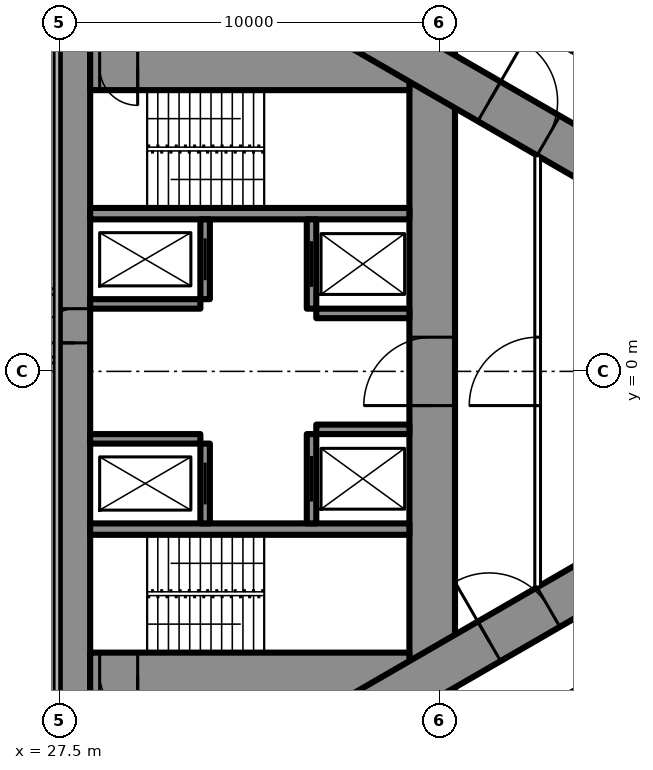
"""IFC4 building model, lengths in metres.
Left out: names, types, materials, properties, quantities, classifications, styles, units other than length and angle.
Written with IfcOpenShell. Run it as: python <this file> out.ifc"""

import sys

from ifc_helpers import new_model, si_unit, direction, frame, frame_2d, origin, place, context, subcontext, project, spatial, rectangle, extrude, element, fill, save


model = new_model("IFC4")
c1 = context("Model", 3, precision=1e-05, world=origin(), true_north=direction((0.0, 1.0)))
c2 = subcontext(c1, "Body", "Model", "MODEL_VIEW")
j1 = project(units=[si_unit("LENGTHUNIT", "METRE"), si_unit("PLANEANGLEUNIT", "RADIAN")], contexts=[c1])
p1 = place(None, origin())
s1 = spatial("IfcSite", under=j1, at=p1, CompositionType="ELEMENT")
p2 = place(p1, origin())
s2 = spatial("IfcBuilding", under=s1, at=p2, CompositionType="ELEMENT")
p3 = place(p2, frame((0.0, 0.0, 247.7)))
s3 = spatial("IfcBuildingStorey", under=s2, at=p3, CompositionType="ELEMENT", Elevation=247.7)
p4 = place(p3, frame((27.9, -8.6, 0.0), z_axis=(0.0, 0.0, 1.0), x_axis=(0.0, 1.0, 0.0)))
e1 = element("IfcWall", 1, at=p4, inside=s3, PredefinedType="SHEAR", context=c2, shape_type="SweptSolid", body=[
    extrude(rectangle(XDim=17.2, YDim=0.8, at=frame_2d((8.6, 0.0))), origin(), (0.0, 0.0, 1.0), 4.2),
])
p5 = place(p4, frame((9.35, 0.0, 0.0)))
e2 = element("IfcOpeningElement", 2, at=p5, cuts=e1, PredefinedType="OPENING", context=c2, shape_type="SweptSolid", body=[
    extrude(rectangle(XDim=0.9, YDim=2.2, at=frame_2d((0.45, 1.1))), frame((0.0, 0.41, 0.0), z_axis=(0.0, -1.0, 0.0), x_axis=(1.0, 0.0, 0.0)), (0.0, 0.0, 1.0), 0.82),
])
p6 = place(p3, frame((37.3, -8.6, 0.0), z_axis=(0.0, 0.0, 1.0), x_axis=(0.0, 1.0, 0.0)))
e3 = element("IfcWall", 3, at=p6, inside=s3, PredefinedType="SHEAR", context=c2, shape_type="SweptSolid", body=[
    extrude(rectangle(XDim=17.2, YDim=1.2, at=frame_2d((8.6, 0.0))), origin(), (0.0, 0.0, 1.0), 4.2),
])
p7 = place(p6, frame((7.7, 0.0, 0.0)))
e4 = element("IfcOpeningElement", 4, at=p7, cuts=e3, PredefinedType="OPENING", context=c2, shape_type="SweptSolid", body=[
    extrude(rectangle(XDim=1.8, YDim=2.2, at=frame_2d((0.9, 1.1))), frame((0.0, 0.61, 0.0), z_axis=(0.0, -1.0, 0.0), x_axis=(1.0, 0.0, 0.0)), (0.0, 0.0, 1.0), 1.22),
])
p8 = place(p3, frame((28.3, -8.0, 0.0), z_axis=(0.0, 0.0, 1.0), x_axis=(1.0, 0.0, 0.0)))
e5 = element("IfcWall", 5, at=p8, inside=s3, PredefinedType="SHEAR", context=c2, shape_type="SweptSolid", body=[
    extrude(rectangle(XDim=8.4, YDim=1.2, at=frame_2d((4.2, 0.0))), origin(), (0.0, 0.0, 1.0), 4.2),
])
p9 = place(p8, frame((0.25, 0.0, 0.0)))
e6 = element("IfcOpeningElement", 6, at=p9, cuts=e5, PredefinedType="OPENING", context=c2, shape_type="SweptSolid", body=[
    extrude(rectangle(XDim=1.0, YDim=2.2, at=frame_2d((0.5, 1.1))), frame((0.0, 0.61, 0.0), z_axis=(0.0, -1.0, 0.0), x_axis=(1.0, 0.0, 0.0)), (0.0, 0.0, 1.0), 1.22),
])
p10 = place(p3, frame((28.3, 8.0, 0.0), z_axis=(0.0, 0.0, 1.0), x_axis=(1.0, 0.0, 0.0)))
e7 = element("IfcWall", 7, at=p10, inside=s3, PredefinedType="SHEAR", context=c2, shape_type="SweptSolid", body=[
    extrude(rectangle(XDim=8.4, YDim=1.2, at=frame_2d((4.2, 0.0))), origin(), (0.0, 0.0, 1.0), 4.2),
])
p11 = place(p10, frame((0.25, 0.0, 0.0)))
e8 = element("IfcOpeningElement", 8, at=p11, cuts=e7, PredefinedType="OPENING", context=c2, shape_type="SweptSolid", body=[
    extrude(rectangle(XDim=1.0, YDim=2.2, at=frame_2d((0.5, 1.1))), frame((0.0, 0.61, 0.0), z_axis=(0.0, -1.0, 0.0), x_axis=(1.0, 0.0, 0.0)), (0.0, 0.0, 1.0), 1.22),
])
for number, where, z_axis, x_axis in (
    (9, (28.3, -4.15, 0.0), (0.0, 0.0, 1.0), (1.0, 0.0, 0.0)),
    (10, (28.3, 4.15, 0.0), (0.0, 0.0, 1.0), (1.0, 0.0, 0.0)),
):
    element("IfcWall", number, at=place(p3, frame(where, z_axis=z_axis, x_axis=x_axis)), inside=s3, PredefinedType="SHEAR", context=c2, shape_type="SweptSolid", body=[
        extrude(rectangle(XDim=8.4, YDim=0.3, at=frame_2d((4.2, 0.0))), origin(), (0.0, 0.0, 1.0), 4.2),
    ])
p12 = place(p3, frame((31.325, -4.0, 0.0), z_axis=(0.0, 0.0, 1.0), x_axis=(0.0, 1.0, 0.0)))
e11 = element("IfcWall", 11, at=p12, inside=s3, PredefinedType="SHEAR", context=c2, shape_type="SweptSolid", body=[
    extrude(rectangle(XDim=2.1, YDim=0.25, at=frame_2d((1.05, 0.0))), origin(), (0.0, 0.0, 1.0), 4.2),
])
p13 = place(p12, frame((0.5, 0.0, 0.0)))
e12 = element("IfcOpeningElement", 12, at=p13, cuts=e11, PredefinedType="OPENING", context=c2, shape_type="SweptSolid", body=[
    extrude(rectangle(XDim=1.1, YDim=2.2, at=frame_2d((0.55, 1.1))), frame((0.0, 0.135, 0.0), z_axis=(0.0, -1.0, 0.0), x_axis=(1.0, 0.0, 0.0)), (0.0, 0.0, 1.0), 0.27),
])
p14 = place(p3, frame((34.125, -4.0, 0.0), z_axis=(0.0, 0.0, 1.0), x_axis=(0.0, 1.0, 0.0)))
e13 = element("IfcWall", 13, at=p14, inside=s3, PredefinedType="SHEAR", context=c2, shape_type="SweptSolid", body=[
    extrude(rectangle(XDim=2.35, YDim=0.25, at=frame_2d((1.175, 0.0))), origin(), (0.0, 0.0, 1.0), 4.2),
])
p15 = place(p14, frame((0.575, 0.0, 0.0)))
e14 = element("IfcOpeningElement", 14, at=p15, cuts=e13, PredefinedType="OPENING", context=c2, shape_type="SweptSolid", body=[
    extrude(rectangle(XDim=1.2, YDim=2.2, at=frame_2d((0.6, 1.1))), frame((0.0, 0.135, 0.0), z_axis=(0.0, -1.0, 0.0), x_axis=(1.0, 0.0, 0.0)), (0.0, 0.0, 1.0), 0.27),
])
p16 = place(p3, frame((28.3, -1.775, 0.0), z_axis=(0.0, 0.0, 1.0), x_axis=(1.0, 0.0, 0.0)))
e15 = element("IfcWall", 15, at=p16, inside=s3, PredefinedType="SHEAR", context=c2, shape_type="SweptSolid", body=[
    extrude(rectangle(XDim=2.9, YDim=0.25, at=frame_2d((1.45, 0.0))), origin(), (0.0, 0.0, 1.0), 4.2),
])
p17 = place(p3, frame((34.25, -1.525, 0.0), z_axis=(0.0, 0.0, 1.0), x_axis=(1.0, 0.0, 0.0)))
e16 = element("IfcWall", 16, at=p17, inside=s3, PredefinedType="SHEAR", context=c2, shape_type="SweptSolid", body=[
    extrude(rectangle(XDim=2.45, YDim=0.25, at=frame_2d((1.225, 0.0))), origin(), (0.0, 0.0, 1.0), 4.2),
])
p18 = place(p3, frame((31.325, 1.9, 0.0), z_axis=(0.0, 0.0, 1.0), x_axis=(0.0, 1.0, 0.0)))
e17 = element("IfcWall", 17, at=p18, inside=s3, PredefinedType="SHEAR", context=c2, shape_type="SweptSolid", body=[
    extrude(rectangle(XDim=2.1, YDim=0.25, at=frame_2d((1.05, 0.0))), origin(), (0.0, 0.0, 1.0), 4.2),
])
p19 = place(p18, frame((0.5, 0.0, 0.0)))
e18 = element("IfcOpeningElement", 18, at=p19, cuts=e17, PredefinedType="OPENING", context=c2, shape_type="SweptSolid", body=[
    extrude(rectangle(XDim=1.1, YDim=2.2, at=frame_2d((0.55, 1.1))), frame((0.0, 0.135, 0.0), z_axis=(0.0, -1.0, 0.0), x_axis=(1.0, 0.0, 0.0)), (0.0, 0.0, 1.0), 0.27),
])
p20 = place(p3, frame((34.125, 1.65, 0.0), z_axis=(0.0, 0.0, 1.0), x_axis=(0.0, 1.0, 0.0)))
e19 = element("IfcWall", 19, at=p20, inside=s3, PredefinedType="SHEAR", context=c2, shape_type="SweptSolid", body=[
    extrude(rectangle(XDim=2.35, YDim=0.25, at=frame_2d((1.175, 0.0))), origin(), (0.0, 0.0, 1.0), 4.2),
])
p21 = place(p20, frame((0.575, 0.0, 0.0)))
e20 = element("IfcOpeningElement", 20, at=p21, cuts=e19, PredefinedType="OPENING", context=c2, shape_type="SweptSolid", body=[
    extrude(rectangle(XDim=1.2, YDim=2.2, at=frame_2d((0.6, 1.1))), frame((0.0, 0.135, 0.0), z_axis=(0.0, -1.0, 0.0), x_axis=(1.0, 0.0, 0.0)), (0.0, 0.0, 1.0), 0.27),
])
p22 = place(p3, frame((28.3, 1.775, 0.0), z_axis=(0.0, 0.0, 1.0), x_axis=(1.0, 0.0, 0.0)))
e21 = element("IfcWall", 21, at=p22, inside=s3, PredefinedType="SHEAR", context=c2, shape_type="SweptSolid", body=[
    extrude(rectangle(XDim=2.9, YDim=0.25, at=frame_2d((1.45, 0.0))), origin(), (0.0, 0.0, 1.0), 4.2),
])
p23 = place(p3, frame((34.25, 1.525, 0.0), z_axis=(0.0, 0.0, 1.0), x_axis=(1.0, 0.0, 0.0)))
e22 = element("IfcWall", 22, at=p23, inside=s3, PredefinedType="SHEAR", context=c2, shape_type="SweptSolid", body=[
    extrude(rectangle(XDim=2.45, YDim=0.25, at=frame_2d((1.225, 0.0))), origin(), (0.0, 0.0, 1.0), 4.2),
])
p24 = place(p3, frame((27.2, -13.8, 0.0), z_axis=(0.0, 0.0, 1.0), x_axis=(0.866027159892, 0.499996958321, 0.0)))
e23 = element("IfcWall", 23, at=p24, inside=s3, PredefinedType="SHEAR", context=c2, shape_type="SweptSolid", body=[
    extrude(rectangle(XDim=27.947, YDim=1.2, at=frame_2d((13.973, 0.0))), origin(), (0.0, 0.0, 1.0), 4.2),
])
p25 = place(p24, frame((4.6, 0.0, 0.0)))
e24 = element("IfcOpeningElement", 24, at=p25, cuts=e23, PredefinedType="OPENING", context=c2, shape_type="SweptSolid", body=[
    extrude(rectangle(XDim=1.0, YDim=2.2, at=frame_2d((0.5, 1.1))), frame((0.0, 0.61, 0.0), z_axis=(0.0, -1.0, 0.0), x_axis=(1.0, 0.0, 0.0)), (0.0, 0.0, 1.0), 1.22),
])
p26 = place(p24, frame((13.395, 0.0, 0.0)))
e25 = element("IfcOpeningElement", 25, at=p26, cuts=e23, PredefinedType="OPENING", context=c2, shape_type="SweptSolid", body=[
    extrude(rectangle(XDim=1.8, YDim=2.2, at=frame_2d((0.9, 1.1))), frame((0.0, 0.61, 0.0), z_axis=(0.0, -1.0, 0.0), x_axis=(1.0, 0.0, 0.0)), (0.0, 0.0, 1.0), 1.22),
])
p27 = place(p3, frame((27.2, 13.8, 0.0), z_axis=(0.0, 0.0, 1.0), x_axis=(0.866024515034, -0.500001539357, 0.0)))
e26 = element("IfcWall", 26, at=p27, inside=s3, PredefinedType="SHEAR", context=c2, shape_type="SweptSolid", body=[
    extrude(rectangle(XDim=26.907, YDim=1.2, at=frame_2d((13.454, 0.0))), origin(), (0.0, 0.0, 1.0), 4.2),
])
p28 = place(p27, frame((4.6, 0.0, 0.0)))
e27 = element("IfcOpeningElement", 27, at=p28, cuts=e26, PredefinedType="OPENING", context=c2, shape_type="SweptSolid", body=[
    extrude(rectangle(XDim=1.0, YDim=2.2, at=frame_2d((0.5, 1.1))), frame((0.0, 0.61, 0.0), z_axis=(0.0, -1.0, 0.0), x_axis=(1.0, 0.0, 0.0)), (0.0, 0.0, 1.0), 1.22),
])
p29 = place(p27, frame((13.395, 0.0, 0.0)))
e28 = element("IfcOpeningElement", 28, at=p29, cuts=e26, PredefinedType="OPENING", context=c2, shape_type="SweptSolid", body=[
    extrude(rectangle(XDim=1.8, YDim=2.2, at=frame_2d((0.9, 1.1))), frame((0.0, 0.61, 0.0), z_axis=(0.0, -1.0, 0.0), x_axis=(1.0, 0.0, 0.0)), (0.0, 0.0, 1.0), 1.22),
])
p30 = place(p3, frame((28.907, -15.47, 0.0), z_axis=(0.0, 0.0, 1.0), x_axis=(0.866023700353, 0.500002950419, 0.0)))
e29 = element("IfcWall", 29, at=p30, inside=s3, PredefinedType="PARTITIONING", context=c2, shape_type="SweptSolid", body=[
    extrude(rectangle(XDim=30.941, YDim=0.2, at=frame_2d((15.47, 0.0))), origin(), (0.0, 0.0, 1.0), 3.95),
])
p31 = place(p30, frame((7.124, 0.0, 0.0)))
e30 = element("IfcOpeningElement", 30, at=p31, cuts=e29, PredefinedType="OPENING", context=c2, shape_type="SweptSolid", body=[
    extrude(rectangle(XDim=1.8, YDim=2.2, at=frame_2d((0.9, 1.1))), frame((0.0, 0.11, 0.0), z_axis=(0.0, -1.0, 0.0), x_axis=(1.0, 0.0, 0.0)), (0.0, 0.0, 1.0), 0.22),
])
p32 = place(p30, frame((16.865, 0.0, 0.0)))
e31 = element("IfcOpeningElement", 31, at=p32, cuts=e29, PredefinedType="OPENING", context=c2, shape_type="SweptSolid", body=[
    extrude(rectangle(XDim=1.8, YDim=2.2, at=frame_2d((0.9, 1.1))), frame((0.0, 0.11, 0.0), z_axis=(0.0, -1.0, 0.0), x_axis=(1.0, 0.0, 0.0)), (0.0, 0.0, 1.0), 0.22),
])
p33 = place(p30, frame((20.748, 0.0, 0.0)))
e32 = element("IfcOpeningElement", 32, at=p33, cuts=e29, PredefinedType="OPENING", context=c2, shape_type="SweptSolid", body=[
    extrude(rectangle(XDim=1.8, YDim=2.2, at=frame_2d((0.9, 1.1))), frame((0.0, 0.11, 0.0), z_axis=(0.0, -1.0, 0.0), x_axis=(1.0, 0.0, 0.0)), (0.0, 0.0, 1.0), 0.22),
])
p34 = place(p30, frame((26.252, 0.0, 0.0)))
e33 = element("IfcOpeningElement", 33, at=p34, cuts=e29, PredefinedType="OPENING", context=c2, shape_type="SweptSolid", body=[
    extrude(rectangle(XDim=1.8, YDim=2.2, at=frame_2d((0.9, 1.1))), frame((0.0, 0.11, 0.0), z_axis=(0.0, -1.0, 0.0), x_axis=(1.0, 0.0, 0.0)), (0.0, 0.0, 1.0), 0.22),
])
p35 = place(p3, frame((28.907, 15.47, 0.0), z_axis=(0.0, 0.0, 1.0), x_axis=(0.866026627509, -0.499997880441, 0.0)))
e34 = element("IfcWall", 34, at=p35, inside=s3, PredefinedType="PARTITIONING", context=c2, shape_type="SweptSolid", body=[
    extrude(rectangle(XDim=20.563, YDim=0.2, at=frame_2d((10.282, 0.0))), origin(), (0.0, 0.0, 1.0), 3.95),
])
p36 = place(p35, frame((17.081, 0.0, 0.0)))
e35 = element("IfcOpeningElement", 35, at=p36, cuts=e34, PredefinedType="OPENING", context=c2, shape_type="SweptSolid", body=[
    extrude(rectangle(XDim=2.0, YDim=2.4, at=frame_2d((1.0, 1.2))), frame((0.0, 0.11, 0.0), z_axis=(0.0, -1.0, 0.0), x_axis=(1.0, 0.0, 0.0)), (0.0, 0.0, 1.0), 0.22),
])
p37 = place(p35, frame((7.124, 0.0, 0.0)))
e36 = element("IfcOpeningElement", 36, at=p37, cuts=e34, PredefinedType="OPENING", context=c2, shape_type="SweptSolid", body=[
    extrude(rectangle(XDim=1.8, YDim=2.2, at=frame_2d((0.9, 1.1))), frame((0.0, 0.11, 0.0), z_axis=(0.0, -1.0, 0.0), x_axis=(1.0, 0.0, 0.0)), (0.0, 0.0, 1.0), 0.22),
])
p38 = place(p3, frame((40.075, -5.674, 0.0), z_axis=(0.0, 0.0, 1.0), x_axis=(0.0, 1.0, 0.0)))
e37 = element("IfcWall", 37, at=p38, inside=s3, PredefinedType="PARTITIONING", context=c2, shape_type="SweptSolid", body=[
    extrude(rectangle(XDim=11.348, YDim=0.15, at=frame_2d((5.674, 0.0))), origin(), (0.0, 0.0, 1.0), 3.95),
])
p39 = place(p38, frame((4.774, 0.0, 0.0)))
e38 = element("IfcOpeningElement", 38, at=p39, cuts=e37, PredefinedType="OPENING", context=c2, shape_type="SweptSolid", body=[
    extrude(rectangle(XDim=1.8, YDim=2.2, at=frame_2d((0.9, 1.1))), frame((0.0, 0.085, 0.0), z_axis=(0.0, -1.0, 0.0), x_axis=(1.0, 0.0, 0.0)), (0.0, 0.0, 1.0), 0.17),
])
p40 = place(p3, frame((-27.5, 0.3, 0.0), z_axis=(0.0, 0.0, 1.0), x_axis=(1.0, 0.0, 0.0)))
e39 = element("IfcWall", 39, at=p40, inside=s3, PredefinedType="PARTITIONING", context=c2, shape_type="SweptSolid", body=[
    extrude(rectangle(XDim=55.0, YDim=0.15, at=frame_2d((27.5, 0.0))), origin(), (0.0, 0.0, 1.0), 3.0),
])
p41 = place(p40, frame((1.575, 0.0, 0.0)))
e40 = element("IfcOpeningElement", 40, at=p41, cuts=e39, PredefinedType="OPENING", context=c2, shape_type="SweptSolid", body=[
    extrude(rectangle(XDim=1.0, YDim=2.2, at=frame_2d((0.5, 1.1))), frame((0.0, 0.085, 0.0), z_axis=(0.0, -1.0, 0.0), x_axis=(1.0, 0.0, 0.0)), (0.0, 0.0, 1.0), 0.17),
])
p42 = place(p40, frame((8.525, 0.0, 0.0)))
e41 = element("IfcOpeningElement", 41, at=p42, cuts=e39, PredefinedType="OPENING", context=c2, shape_type="SweptSolid", body=[
    extrude(rectangle(XDim=1.05, YDim=2.4, at=frame_2d((0.525, 1.2))), frame((0.0, 0.085, 0.0), z_axis=(0.0, -1.0, 0.0), x_axis=(1.0, 0.0, 0.0)), (0.0, 0.0, 1.0), 0.17),
])
p43 = place(p40, frame((19.525, 0.0, 0.0)))
e42 = element("IfcOpeningElement", 42, at=p43, cuts=e39, PredefinedType="OPENING", context=c2, shape_type="SweptSolid", body=[
    extrude(rectangle(XDim=1.05, YDim=2.4, at=frame_2d((0.525, 1.2))), frame((0.0, 0.085, 0.0), z_axis=(0.0, -1.0, 0.0), x_axis=(1.0, 0.0, 0.0)), (0.0, 0.0, 1.0), 0.17),
])
p44 = place(p40, frame((25.025, 0.0, 0.0)))
e43 = element("IfcOpeningElement", 43, at=p44, cuts=e39, PredefinedType="OPENING", context=c2, shape_type="SweptSolid", body=[
    extrude(rectangle(XDim=1.05, YDim=2.4, at=frame_2d((0.525, 1.2))), frame((0.0, 0.085, 0.0), z_axis=(0.0, -1.0, 0.0), x_axis=(1.0, 0.0, 0.0)), (0.0, 0.0, 1.0), 0.17),
])
p45 = place(p40, frame((30.525, 0.0, 0.0)))
e44 = element("IfcOpeningElement", 44, at=p45, cuts=e39, PredefinedType="OPENING", context=c2, shape_type="SweptSolid", body=[
    extrude(rectangle(XDim=1.05, YDim=2.4, at=frame_2d((0.525, 1.2))), frame((0.0, 0.085, 0.0), z_axis=(0.0, -1.0, 0.0), x_axis=(1.0, 0.0, 0.0)), (0.0, 0.0, 1.0), 0.17),
])
p46 = place(p40, frame((41.525, 0.0, 0.0)))
e45 = element("IfcOpeningElement", 45, at=p46, cuts=e39, PredefinedType="OPENING", context=c2, shape_type="SweptSolid", body=[
    extrude(rectangle(XDim=1.05, YDim=2.4, at=frame_2d((0.525, 1.2))), frame((0.0, 0.085, 0.0), z_axis=(0.0, -1.0, 0.0), x_axis=(1.0, 0.0, 0.0)), (0.0, 0.0, 1.0), 0.17),
])
p47 = place(p40, frame((52.525, 0.0, 0.0)))
e46 = element("IfcOpeningElement", 46, at=p47, cuts=e39, PredefinedType="OPENING", context=c2, shape_type="SweptSolid", body=[
    extrude(rectangle(XDim=1.05, YDim=2.4, at=frame_2d((0.525, 1.2))), frame((0.0, 0.085, 0.0), z_axis=(0.0, -1.0, 0.0), x_axis=(1.0, 0.0, 0.0)), (0.0, 0.0, 1.0), 0.17),
])
p48 = place(p3, frame((-27.5, 2.1, 0.0), z_axis=(0.0, 0.0, 1.0), x_axis=(1.0, 0.0, 0.0)))
e47 = element("IfcWall", 47, at=p48, inside=s3, PredefinedType="PARTITIONING", context=c2, shape_type="SweptSolid", body=[
    extrude(rectangle(XDim=55.0, YDim=0.15, at=frame_2d((27.5, 0.0))), origin(), (0.0, 0.0, 1.0), 4.0),
])
p49 = place(p48, frame((2.025, 0.0, 0.0)))
e48 = element("IfcOpeningElement", 48, at=p49, cuts=e47, PredefinedType="OPENING", context=c2, shape_type="SweptSolid", body=[
    extrude(rectangle(XDim=1.05, YDim=2.4, at=frame_2d((0.525, 1.2))), frame((0.0, 0.085, 0.0), z_axis=(0.0, -1.0, 0.0), x_axis=(1.0, 0.0, 0.0)), (0.0, 0.0, 1.0), 0.17),
])
p50 = place(p48, frame((8.525, 0.0, 0.0)))
e49 = element("IfcOpeningElement", 49, at=p50, cuts=e47, PredefinedType="OPENING", context=c2, shape_type="SweptSolid", body=[
    extrude(rectangle(XDim=1.05, YDim=2.4, at=frame_2d((0.525, 1.2))), frame((0.0, 0.085, 0.0), z_axis=(0.0, -1.0, 0.0), x_axis=(1.0, 0.0, 0.0)), (0.0, 0.0, 1.0), 0.17),
])
p51 = place(p48, frame((19.525, 0.0, 0.0)))
e50 = element("IfcOpeningElement", 50, at=p51, cuts=e47, PredefinedType="OPENING", context=c2, shape_type="SweptSolid", body=[
    extrude(rectangle(XDim=1.05, YDim=2.4, at=frame_2d((0.525, 1.2))), frame((0.0, 0.085, 0.0), z_axis=(0.0, -1.0, 0.0), x_axis=(1.0, 0.0, 0.0)), (0.0, 0.0, 1.0), 0.17),
])
p52 = place(p48, frame((30.525, 0.0, 0.0)))
e51 = element("IfcOpeningElement", 51, at=p52, cuts=e47, PredefinedType="OPENING", context=c2, shape_type="SweptSolid", body=[
    extrude(rectangle(XDim=1.05, YDim=2.4, at=frame_2d((0.525, 1.2))), frame((0.0, 0.085, 0.0), z_axis=(0.0, -1.0, 0.0), x_axis=(1.0, 0.0, 0.0)), (0.0, 0.0, 1.0), 0.17),
])
p53 = place(p48, frame((41.525, 0.0, 0.0)))
e52 = element("IfcOpeningElement", 52, at=p53, cuts=e47, PredefinedType="OPENING", context=c2, shape_type="SweptSolid", body=[
    extrude(rectangle(XDim=1.05, YDim=2.4, at=frame_2d((0.525, 1.2))), frame((0.0, 0.085, 0.0), z_axis=(0.0, -1.0, 0.0), x_axis=(1.0, 0.0, 0.0)), (0.0, 0.0, 1.0), 0.17),
])
p54 = place(p48, frame((52.525, 0.0, 0.0)))
e53 = element("IfcOpeningElement", 53, at=p54, cuts=e47, PredefinedType="OPENING", context=c2, shape_type="SweptSolid", body=[
    extrude(rectangle(XDim=1.05, YDim=2.4, at=frame_2d((0.525, 1.2))), frame((0.0, 0.085, 0.0), z_axis=(0.0, -1.0, 0.0), x_axis=(1.0, 0.0, 0.0)), (0.0, 0.0, 1.0), 0.17),
])
p55 = place(p39, origin())
e54 = element("IfcDoor", 54, at=p55, inside=s3, OperationType="DOUBLE_DOOR_SINGLE_SWING", PredefinedType="DOOR", context=c2, shape_type="SweptSolid", body=[
    extrude(rectangle(XDim=1.8, YDim=2.2, at=frame_2d((0.9, 1.1))), frame((0.0, 0.025, 0.0), z_axis=(0.0, -1.0, 0.0), x_axis=(1.0, 0.0, 0.0)), (0.0, 0.0, 1.0), 0.05),
])
fill(e38, e54)
p56 = place(p26, origin())
e55 = element("IfcDoor", 55, at=p56, inside=s3, OperationType="DOUBLE_DOOR_SINGLE_SWING", PredefinedType="DOOR", context=c2, shape_type="SweptSolid", body=[
    extrude(rectangle(XDim=1.8, YDim=2.2, at=frame_2d((0.9, 1.1))), frame((0.0, 0.025, 0.0), z_axis=(0.0, -1.0, 0.0), x_axis=(1.0, 0.0, 0.0)), (0.0, 0.0, 1.0), 0.05),
])
fill(e25, e55)
p57 = place(p29, origin())
e56 = element("IfcDoor", 56, at=p57, inside=s3, OperationType="DOUBLE_DOOR_SINGLE_SWING", PredefinedType="DOOR", context=c2, shape_type="SweptSolid", body=[
    extrude(rectangle(XDim=1.8, YDim=2.2, at=frame_2d((0.9, 1.1))), frame((0.0, 0.025, 0.0), z_axis=(0.0, -1.0, 0.0), x_axis=(1.0, 0.0, 0.0)), (0.0, 0.0, 1.0), 0.05),
])
fill(e28, e56)
p58 = place(p7, origin())
e57 = element("IfcDoor", 57, at=p58, inside=s3, OperationType="DOUBLE_DOOR_SINGLE_SWING", PredefinedType="DOOR", context=c2, shape_type="SweptSolid", body=[
    extrude(rectangle(XDim=1.8, YDim=2.2, at=frame_2d((0.9, 1.1))), frame((0.0, 0.025, 0.0), z_axis=(0.0, -1.0, 0.0), x_axis=(1.0, 0.0, 0.0)), (0.0, 0.0, 1.0), 0.05),
])
fill(e4, e57)
p59 = place(p9, origin())
e58 = element("IfcDoor", 58, at=p59, inside=s3, OperationType="SINGLE_SWING_RIGHT", PredefinedType="DOOR", context=c2, shape_type="SweptSolid", body=[
    extrude(rectangle(XDim=1.0, YDim=2.2, at=frame_2d((0.5, 1.1))), frame((0.0, 0.025, 0.0), z_axis=(0.0, -1.0, 0.0), x_axis=(1.0, 0.0, 0.0)), (0.0, 0.0, 1.0), 0.05),
])
fill(e6, e58)
p60 = place(p11, origin())
e59 = element("IfcDoor", 59, at=p60, inside=s3, OperationType="SINGLE_SWING_RIGHT", PredefinedType="DOOR", context=c2, shape_type="SweptSolid", body=[
    extrude(rectangle(XDim=1.0, YDim=2.2, at=frame_2d((0.5, 1.1))), frame((0.0, 0.025, 0.0), z_axis=(0.0, -1.0, 0.0), x_axis=(1.0, 0.0, 0.0)), (0.0, 0.0, 1.0), 0.05),
])
fill(e8, e59)
p61 = place(p5, origin())
e60 = element("IfcDoor", 60, at=p61, inside=s3, OperationType="SINGLE_SWING_LEFT", PredefinedType="DOOR", context=c2, shape_type="SweptSolid", body=[
    extrude(rectangle(XDim=0.9, YDim=2.2, at=frame_2d((0.45, 1.1))), frame((0.0, 0.025, 0.0), z_axis=(0.0, -1.0, 0.0), x_axis=(1.0, 0.0, 0.0)), (0.0, 0.0, 1.0), 0.05),
])
fill(e2, e60)
p62 = place(p13, origin())
e61 = element("IfcDoor", 61, at=p62, inside=s3, OperationType="SLIDING_TO_LEFT", PredefinedType="USERDEFINED", context=c2, shape_type="SweptSolid", body=[
    extrude(rectangle(XDim=1.1, YDim=2.2, at=frame_2d((0.55, 1.1))), frame((0.0, 0.025, 0.0), z_axis=(0.0, -1.0, 0.0), x_axis=(1.0, 0.0, 0.0)), (0.0, 0.0, 1.0), 0.05),
])
fill(e12, e61)
p63 = place(p19, origin())
e62 = element("IfcDoor", 62, at=p63, inside=s3, OperationType="SLIDING_TO_LEFT", PredefinedType="USERDEFINED", context=c2, shape_type="SweptSolid", body=[
    extrude(rectangle(XDim=1.1, YDim=2.2, at=frame_2d((0.55, 1.1))), frame((0.0, 0.025, 0.0), z_axis=(0.0, -1.0, 0.0), x_axis=(1.0, 0.0, 0.0)), (0.0, 0.0, 1.0), 0.05),
])
fill(e18, e62)
p64 = place(p15, origin())
e63 = element("IfcDoor", 63, at=p64, inside=s3, OperationType="DOUBLE_DOOR_SLIDING", PredefinedType="USERDEFINED", context=c2, shape_type="SweptSolid", body=[
    extrude(rectangle(XDim=1.2, YDim=2.2, at=frame_2d((0.6, 1.1))), frame((0.0, 0.025, 0.0), z_axis=(0.0, -1.0, 0.0), x_axis=(1.0, 0.0, 0.0)), (0.0, 0.0, 1.0), 0.05),
])
fill(e14, e63)
p65 = place(p21, origin())
e64 = element("IfcDoor", 64, at=p65, inside=s3, OperationType="DOUBLE_DOOR_SLIDING", PredefinedType="USERDEFINED", context=c2, shape_type="SweptSolid", body=[
    extrude(rectangle(XDim=1.2, YDim=2.2, at=frame_2d((0.6, 1.1))), frame((0.0, 0.025, 0.0), z_axis=(0.0, -1.0, 0.0), x_axis=(1.0, 0.0, 0.0)), (0.0, 0.0, 1.0), 0.05),
])
fill(e20, e64)
save(model, sys.argv[1])
